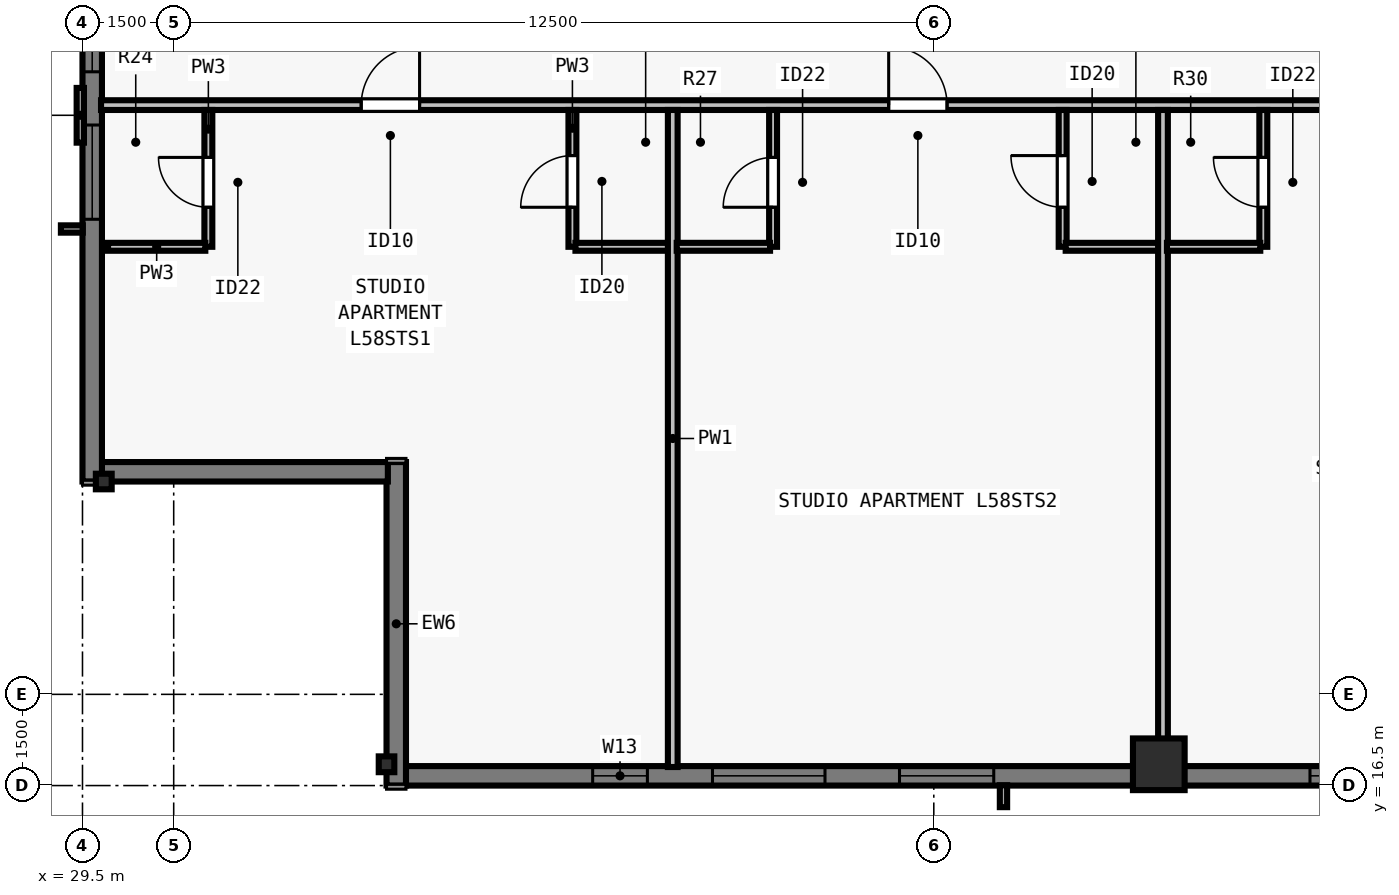
"""IFC4 building model, lengths in metres.
Left out: names, types, materials, properties, quantities, classifications, styles, units other than length and angle.
Written with IfcOpenShell. Run it as: python <this file> out.ifc"""

import sys

from ifc_helpers import new_model, si_unit, direction, frame, frame_2d, origin, origin_2d, place, context, subcontext, project, spatial, rectangle, i_section, extrude, element, fill, save


model = new_model("IFC4")
c1 = context("Model", 3, precision=1e-05, world=origin(), true_north=direction((0.0, 1.0)))
c2 = subcontext(c1, "Body", "Model", "MODEL_VIEW")
j1 = project(units=[si_unit("LENGTHUNIT", "METRE"), si_unit("PLANEANGLEUNIT", "RADIAN")], contexts=[c1])
p1 = place(None, origin())
s1 = spatial("IfcSite", under=j1, at=p1, CompositionType="ELEMENT")
p2 = place(p1, origin())
s2 = spatial("IfcBuilding", under=s1, at=p2, CompositionType="ELEMENT")
p3 = place(p2, frame((0.0, 0.0, 213.0)))
s3 = spatial("IfcBuildingStorey", under=s2, at=p3, CompositionType="ELEMENT", Elevation=213.0)
p4 = place(p3, frame((34.5, 16.85, 0.0), z_axis=(0.0, 0.0, 1.0), x_axis=(1.0, 0.0, 0.0)))
e1 = element("IfcColumn", 1, at=p4, inside=s3, PredefinedType="COLUMN", context=c2, shape_type="SweptSolid", body=[
    extrude(i_section(OverallWidth=0.256, OverallDepth=0.26, WebThickness=0.01, FlangeThickness=0.017, FilletRadius=0.013, at=origin_2d()), origin(), (0.0, 0.0, 1.0), 3.5),
])
p5 = place(p3, frame((47.2, 16.85, 0.0), z_axis=(0.0, 0.0, 1.0), x_axis=(1.0, 0.0, 0.0)))
e2 = element("IfcColumn", 2, at=p5, inside=s3, PredefinedType="COLUMN", context=c2, shape_type="SweptSolid", body=[
    extrude(rectangle(XDim=0.85, YDim=0.85, at=origin_2d()), origin(), (0.0, 0.0, 1.0), 3.5),
])
p6 = place(p3, frame((29.85, 21.5, 0.0), z_axis=(0.0, 0.0, 1.0), x_axis=(0.0, 1.0, 0.0)))
e3 = element("IfcColumn", 3, at=p6, inside=s3, PredefinedType="COLUMN", context=c2, shape_type="SweptSolid", body=[
    extrude(i_section(OverallWidth=0.256, OverallDepth=0.26, WebThickness=0.01, FlangeThickness=0.017, FilletRadius=0.013, at=origin_2d()), origin(), (0.0, 0.0, 1.0), 3.5),
])
p7 = place(p3, frame((69.5, 16.66, 0.0), z_axis=(0.0, 0.0, 1.0), x_axis=(-1.0, 0.0, 0.0)))
e4 = element("IfcWall", 4, at=p7, inside=s3, PredefinedType="SOLIDWALL", context=c2, shape_type="SweptSolid", body=[
    extrude(rectangle(XDim=34.702, YDim=0.32, at=frame_2d((17.351, 0.0))), origin(), (0.0, 0.0, 1.0), 3.29),
])
p8 = place(p7, frame((5.213, 0.0, 0.8)))
e5 = element("IfcOpeningElement", 5, at=p8, cuts=e4, PredefinedType="OPENING", context=c2, shape_type="SweptSolid", body=[
    extrude(rectangle(XDim=1.55, YDim=1.678, at=frame_2d((0.775, 0.839))), frame((0.0, 0.17, 0.0), z_axis=(0.0, -1.0, 0.0), x_axis=(1.0, 0.0, 0.0)), (0.0, 0.0, 1.0), 0.34),
])
p9 = place(p7, frame((7.988, 0.0, 0.8)))
e6 = element("IfcOpeningElement", 6, at=p9, cuts=e4, PredefinedType="OPENING", context=c2, shape_type="SweptSolid", body=[
    extrude(rectangle(XDim=1.85, YDim=1.678, at=frame_2d((0.925, 0.839))), frame((0.0, 0.17, 0.0), z_axis=(0.0, -1.0, 0.0), x_axis=(1.0, 0.0, 0.0)), (0.0, 0.0, 1.0), 0.34),
])
p10 = place(p7, frame((10.263, 0.0, 0.8)))
e7 = element("IfcOpeningElement", 7, at=p10, cuts=e4, PredefinedType="OPENING", context=c2, shape_type="SweptSolid", body=[
    extrude(rectangle(XDim=1.55, YDim=1.678, at=frame_2d((0.775, 0.839))), frame((0.0, 0.17, 0.0), z_axis=(0.0, -1.0, 0.0), x_axis=(1.0, 0.0, 0.0)), (0.0, 0.0, 1.0), 0.34),
])
p11 = place(p7, frame((14.738, 0.0, 0.8)))
e8 = element("IfcOpeningElement", 8, at=p11, cuts=e4, PredefinedType="OPENING", context=c2, shape_type="SweptSolid", body=[
    extrude(rectangle(XDim=1.85, YDim=1.678, at=frame_2d((0.925, 0.839))), frame((0.0, 0.17, 0.0), z_axis=(0.0, -1.0, 0.0), x_axis=(1.0, 0.0, 0.0)), (0.0, 0.0, 1.0), 0.34),
])
p12 = place(p7, frame((18.264, 0.0, 0.8)))
e9 = element("IfcOpeningElement", 9, at=p12, cuts=e4, PredefinedType="OPENING", context=c2, shape_type="SweptSolid", body=[
    extrude(rectangle(XDim=1.55, YDim=1.678, at=frame_2d((0.775, 0.839))), frame((0.0, 0.17, 0.0), z_axis=(0.0, -1.0, 0.0), x_axis=(1.0, 0.0, 0.0)), (0.0, 0.0, 1.0), 0.34),
])
p13 = place(p7, frame((25.014, 0.0, 0.8)))
e10 = element("IfcOpeningElement", 10, at=p13, cuts=e4, PredefinedType="OPENING", context=c2, shape_type="SweptSolid", body=[
    extrude(rectangle(XDim=1.55, YDim=1.678, at=frame_2d((0.775, 0.839))), frame((0.0, 0.17, 0.0), z_axis=(0.0, -1.0, 0.0), x_axis=(1.0, 0.0, 0.0)), (0.0, 0.0, 1.0), 0.34),
])
p14 = place(p7, frame((27.789, 0.0, 0.8)))
e11 = element("IfcOpeningElement", 11, at=p14, cuts=e4, PredefinedType="OPENING", context=c2, shape_type="SweptSolid", body=[
    extrude(rectangle(XDim=1.85, YDim=1.678, at=frame_2d((0.925, 0.839))), frame((0.0, 0.17, 0.0), z_axis=(0.0, -1.0, 0.0), x_axis=(1.0, 0.0, 0.0)), (0.0, 0.0, 1.0), 0.34),
])
p15 = place(p7, frame((30.71, 0.0, 0.8)))
e12 = element("IfcOpeningElement", 12, at=p15, cuts=e4, PredefinedType="OPENING", context=c2, shape_type="SweptSolid", body=[
    extrude(rectangle(XDim=0.9, YDim=1.678, at=frame_2d((0.45, 0.839))), frame((0.0, 0.17, 0.0), z_axis=(0.0, -1.0, 0.0), x_axis=(1.0, 0.0, 0.0)), (0.0, 0.0, 1.0), 0.34),
])
p16 = place(p3, frame((34.66, 16.5, 0.0), z_axis=(0.0, 0.0, 1.0), x_axis=(0.0, 1.0, 0.0)))
e13 = element("IfcWall", 13, at=p16, inside=s3, PredefinedType="SOLIDWALL", context=c2, shape_type="SweptSolid", body=[
    extrude(rectangle(XDim=5.32, YDim=0.32, at=frame_2d((2.66, 0.0))), origin(), (0.0, 0.0, 1.0), 3.29),
])
p17 = place(p3, frame((34.522, 21.66, 0.0), z_axis=(0.0, 0.0, 1.0), x_axis=(-1.0, 0.0, 0.0)))
e14 = element("IfcWall", 14, at=p17, inside=s3, PredefinedType="SOLIDWALL", context=c2, shape_type="SweptSolid", body=[
    extrude(rectangle(XDim=4.724, YDim=0.32, at=frame_2d((2.362, 0.0))), origin(), (0.0, 0.0, 1.0), 3.29),
])
p18 = place(p3, frame((29.66, 21.5, 0.0), z_axis=(0.0, 0.0, 1.0), x_axis=(0.0, 1.0, 0.0)))
e15 = element("IfcWall", 15, at=p18, inside=s3, PredefinedType="SOLIDWALL", context=c2, shape_type="SweptSolid", body=[
    extrude(rectangle(XDim=34.702, YDim=0.32, at=frame_2d((17.351, 0.0))), origin(), (0.0, 0.0, 1.0), 3.29),
])
p19 = place(p18, frame((4.312, 0.0, 0.8)))
e16 = element("IfcOpeningElement", 16, at=p19, cuts=e15, PredefinedType="OPENING", context=c2, shape_type="SweptSolid", body=[
    extrude(rectangle(XDim=1.55, YDim=1.678, at=frame_2d((0.775, 0.839))), frame((0.0, 0.17, 0.0), z_axis=(0.0, -1.0, 0.0), x_axis=(1.0, 0.0, 0.0)), (0.0, 0.0, 1.0), 0.34),
])
p20 = place(p18, frame((6.738, 0.0, 0.8)))
e17 = element("IfcOpeningElement", 17, at=p20, cuts=e15, PredefinedType="OPENING", context=c2, shape_type="SweptSolid", body=[
    extrude(rectangle(XDim=1.85, YDim=1.678, at=frame_2d((0.925, 0.839))), frame((0.0, 0.17, 0.0), z_axis=(0.0, -1.0, 0.0), x_axis=(1.0, 0.0, 0.0)), (0.0, 0.0, 1.0), 0.34),
])
p21 = place(p18, frame((10.263, 0.0, 0.8)))
e18 = element("IfcOpeningElement", 18, at=p21, cuts=e15, PredefinedType="OPENING", context=c2, shape_type="SweptSolid", body=[
    extrude(rectangle(XDim=1.55, YDim=1.678, at=frame_2d((0.775, 0.839))), frame((0.0, 0.17, 0.0), z_axis=(0.0, -1.0, 0.0), x_axis=(1.0, 0.0, 0.0)), (0.0, 0.0, 1.0), 0.34),
])
p22 = place(p18, frame((14.738, 0.0, 0.8)))
e19 = element("IfcOpeningElement", 19, at=p22, cuts=e15, PredefinedType="OPENING", context=c2, shape_type="SweptSolid", body=[
    extrude(rectangle(XDim=1.85, YDim=1.678, at=frame_2d((0.925, 0.839))), frame((0.0, 0.17, 0.0), z_axis=(0.0, -1.0, 0.0), x_axis=(1.0, 0.0, 0.0)), (0.0, 0.0, 1.0), 0.34),
])
p23 = place(p18, frame((18.264, 0.0, 0.8)))
e20 = element("IfcOpeningElement", 20, at=p23, cuts=e15, PredefinedType="OPENING", context=c2, shape_type="SweptSolid", body=[
    extrude(rectangle(XDim=1.55, YDim=1.678, at=frame_2d((0.775, 0.839))), frame((0.0, 0.17, 0.0), z_axis=(0.0, -1.0, 0.0), x_axis=(1.0, 0.0, 0.0)), (0.0, 0.0, 1.0), 0.34),
])
p24 = place(p18, frame((24.164, 0.0, 0.8)))
e21 = element("IfcOpeningElement", 21, at=p24, cuts=e15, PredefinedType="OPENING", context=c2, shape_type="SweptSolid", body=[
    extrude(rectangle(XDim=1.55, YDim=1.678, at=frame_2d((0.775, 0.839))), frame((0.0, 0.17, 0.0), z_axis=(0.0, -1.0, 0.0), x_axis=(1.0, 0.0, 0.0)), (0.0, 0.0, 1.0), 0.34),
])
p25 = place(p3, frame((29.805, 27.69, 0.0), z_axis=(0.0, 0.0, 1.0), x_axis=(1.0, 0.0, 0.0)))
e22 = element("IfcWall", 22, at=p25, inside=s3, PredefinedType="PARTITIONING", context=c2, shape_type="SweptSolid", body=[
    extrude(rectangle(XDim=44.39, YDim=0.16, at=frame_2d((22.195, 0.0))), origin(), (0.0, 0.0, 1.0), 2.958),
])
p26 = place(p25, frame((4.279, 0.0, 0.0)))
e23 = element("IfcOpeningElement", 23, at=p26, cuts=e22, PredefinedType="OPENING", context=c2, shape_type="SweptSolid", body=[
    extrude(rectangle(XDim=0.96, YDim=2.18, at=frame_2d((0.48, 1.09))), frame((0.0, 0.09, 0.0), z_axis=(0.0, -1.0, 0.0), x_axis=(1.0, 0.0, 0.0)), (0.0, 0.0, 1.0), 0.18),
])
p27 = place(p25, frame((12.953, 0.0, 0.0)))
e24 = element("IfcOpeningElement", 24, at=p27, cuts=e22, PredefinedType="OPENING", context=c2, shape_type="SweptSolid", body=[
    extrude(rectangle(XDim=0.96, YDim=2.18, at=frame_2d((0.48, 1.09))), frame((0.0, 0.09, 0.0), z_axis=(0.0, -1.0, 0.0), x_axis=(1.0, 0.0, 0.0)), (0.0, 0.0, 1.0), 0.18),
])
p28 = place(p25, frame((21.785, 0.0, 0.0)))
e25 = element("IfcOpeningElement", 25, at=p28, cuts=e22, PredefinedType="OPENING", context=c2, shape_type="SweptSolid", body=[
    extrude(rectangle(XDim=0.96, YDim=2.18, at=frame_2d((0.48, 1.09))), frame((0.0, 0.09, 0.0), z_axis=(0.0, -1.0, 0.0), x_axis=(1.0, 0.0, 0.0)), (0.0, 0.0, 1.0), 0.18),
])
p29 = place(p25, frame((30.617, 0.0, 0.0)))
e26 = element("IfcOpeningElement", 26, at=p29, cuts=e22, PredefinedType="OPENING", context=c2, shape_type="SweptSolid", body=[
    extrude(rectangle(XDim=0.96, YDim=2.18, at=frame_2d((0.48, 1.09))), frame((0.0, 0.09, 0.0), z_axis=(0.0, -1.0, 0.0), x_axis=(1.0, 0.0, 0.0)), (0.0, 0.0, 1.0), 0.18),
])
p30 = place(p25, frame((39.221, 0.0, 0.0)))
e27 = element("IfcOpeningElement", 27, at=p30, cuts=e22, PredefinedType="OPENING", context=c2, shape_type="SweptSolid", body=[
    extrude(rectangle(XDim=0.96, YDim=2.18, at=frame_2d((0.48, 1.09))), frame((0.0, 0.09, 0.0), z_axis=(0.0, -1.0, 0.0), x_axis=(1.0, 0.0, 0.0)), (0.0, 0.0, 1.0), 0.18),
])
p31 = place(p3, frame((31.57, 25.36, 0.0), z_axis=(0.0, 0.0, 1.0), x_axis=(0.0, 1.0, 0.0)))
e28 = element("IfcWall", 28, at=p31, inside=s3, PredefinedType="PLUMBINGWALL", context=c2, shape_type="SweptSolid", body=[
    extrude(rectangle(XDim=2.25, YDim=0.13, at=frame_2d((1.125, 0.0))), origin(), (0.0, 0.0, 1.0), 3.29),
])
p32 = place(p31, frame((0.65, 0.0, 0.0)))
e29 = element("IfcOpeningElement", 29, at=p32, cuts=e28, PredefinedType="OPENING", context=c2, shape_type="SweptSolid", body=[
    extrude(rectangle(XDim=0.82, YDim=2.1, at=frame_2d((0.41, 1.05))), frame((0.0, 0.075, 0.0), z_axis=(0.0, -1.0, 0.0), x_axis=(1.0, 0.0, 0.0)), (0.0, 0.0, 1.0), 0.15),
])
p33 = place(p3, frame((29.92, 25.36, 0.0), z_axis=(0.0, 0.0, 1.0), x_axis=(1.0, 0.0, 0.0)))
e30 = element("IfcWall", 30, at=p33, inside=s3, PredefinedType="PLUMBINGWALL", context=c2, shape_type="SweptSolid", body=[
    extrude(rectangle(XDim=1.6, YDim=0.13, at=frame_2d((0.8, 0.0))), origin(), (0.0, 0.0, 1.0), 3.29),
])
p34 = place(p3, frame((37.557, 25.36, 0.0), z_axis=(0.0, 0.0, 1.0), x_axis=(0.0, 1.0, 0.0)))
e31 = element("IfcWall", 31, at=p34, inside=s3, PredefinedType="PLUMBINGWALL", context=c2, shape_type="SweptSolid", body=[
    extrude(rectangle(XDim=2.25, YDim=0.13, at=frame_2d((1.125, 0.0))), origin(), (0.0, 0.0, 1.0), 3.29),
])
p35 = place(p34, frame((0.65, 0.0, 0.0)))
e32 = element("IfcOpeningElement", 32, at=p35, cuts=e31, PredefinedType="OPENING", context=c2, shape_type="SweptSolid", body=[
    extrude(rectangle(XDim=0.85, YDim=2.1, at=frame_2d((0.425, 1.05))), frame((0.0, 0.075, 0.0), z_axis=(0.0, -1.0, 0.0), x_axis=(1.0, 0.0, 0.0)), (0.0, 0.0, 1.0), 0.15),
])
p36 = place(p3, frame((37.607, 25.36, 0.0), z_axis=(0.0, 0.0, 1.0), x_axis=(1.0, 0.0, 0.0)))
e33 = element("IfcWall", 33, at=p36, inside=s3, PredefinedType="PLUMBINGWALL", context=c2, shape_type="SweptSolid", body=[
    extrude(rectangle(XDim=1.6, YDim=0.13, at=frame_2d((0.8, 0.0))), origin(), (0.0, 0.0, 1.0), 3.29),
])
p37 = place(p3, frame((39.207, 16.805, 0.0), z_axis=(0.0, 0.0, 1.0), x_axis=(0.0, 1.0, 0.0)))
e34 = element("IfcWall", 34, at=p37, inside=s3, PredefinedType="PARTITIONING", context=c2, shape_type="SweptSolid", body=[
    extrude(rectangle(XDim=10.805, YDim=0.16, at=frame_2d((5.403, 0.0))), origin(), (0.0, 0.0, 1.0), 2.573),
])
p38 = place(p3, frame((40.857, 25.36, 0.0), z_axis=(0.0, 0.0, 1.0), x_axis=(0.0, 1.0, 0.0)))
e35 = element("IfcWall", 35, at=p38, inside=s3, PredefinedType="PLUMBINGWALL", context=c2, shape_type="SweptSolid", body=[
    extrude(rectangle(XDim=2.25, YDim=0.13, at=frame_2d((1.125, 0.0))), origin(), (0.0, 0.0, 1.0), 2.573),
])
p39 = place(p38, frame((0.65, 0.0, 0.0)))
e36 = element("IfcOpeningElement", 36, at=p39, cuts=e35, PredefinedType="OPENING", context=c2, shape_type="SweptSolid", body=[
    extrude(rectangle(XDim=0.82, YDim=2.1, at=frame_2d((0.41, 1.05))), frame((0.0, 0.075, 0.0), z_axis=(0.0, -1.0, 0.0), x_axis=(1.0, 0.0, 0.0)), (0.0, 0.0, 1.0), 0.15),
])
p40 = place(p3, frame((39.272, 25.36, 0.0), z_axis=(0.0, 0.0, 1.0), x_axis=(1.0, 0.0, 0.0)))
e37 = element("IfcWall", 37, at=p40, inside=s3, PredefinedType="PLUMBINGWALL", context=c2, shape_type="SweptSolid", body=[
    extrude(rectangle(XDim=1.535, YDim=0.13, at=frame_2d((0.768, 0.0))), origin(), (0.0, 0.0, 1.0), 3.29),
])
p41 = place(p3, frame((45.619, 25.36, 0.0), z_axis=(0.0, 0.0, 1.0), x_axis=(0.0, 1.0, 0.0)))
e38 = element("IfcWall", 38, at=p41, inside=s3, PredefinedType="PLUMBINGWALL", context=c2, shape_type="SweptSolid", body=[
    extrude(rectangle(XDim=2.25, YDim=0.13, at=frame_2d((1.125, 0.0))), origin(), (0.0, 0.0, 1.0), 3.29),
])
p42 = place(p41, frame((0.65, 0.0, 0.0)))
e39 = element("IfcOpeningElement", 39, at=p42, cuts=e38, PredefinedType="OPENING", context=c2, shape_type="SweptSolid", body=[
    extrude(rectangle(XDim=0.85, YDim=2.1, at=frame_2d((0.425, 1.05))), frame((0.0, 0.075, 0.0), z_axis=(0.0, -1.0, 0.0), x_axis=(1.0, 0.0, 0.0)), (0.0, 0.0, 1.0), 0.15),
])
p43 = place(p3, frame((45.669, 25.36, 0.0), z_axis=(0.0, 0.0, 1.0), x_axis=(1.0, 0.0, 0.0)))
e40 = element("IfcWall", 40, at=p43, inside=s3, PredefinedType="PLUMBINGWALL", context=c2, shape_type="SweptSolid", body=[
    extrude(rectangle(XDim=1.6, YDim=0.13, at=frame_2d((0.8, 0.0))), origin(), (0.0, 0.0, 1.0), 3.29),
])
p44 = place(p3, frame((47.269, 16.805, 0.0), z_axis=(0.0, 0.0, 1.0), x_axis=(0.0, 1.0, 0.0)))
e41 = element("IfcWall", 41, at=p44, inside=s3, PredefinedType="PARTITIONING", context=c2, shape_type="SweptSolid", body=[
    extrude(rectangle(XDim=10.805, YDim=0.16, at=frame_2d((5.403, 0.0))), origin(), (0.0, 0.0, 1.0), 2.573),
])
p45 = place(p3, frame((48.919, 25.36, 0.0), z_axis=(0.0, 0.0, 1.0), x_axis=(0.0, 1.0, 0.0)))
e42 = element("IfcWall", 42, at=p45, inside=s3, PredefinedType="PLUMBINGWALL", context=c2, shape_type="SweptSolid", body=[
    extrude(rectangle(XDim=2.25, YDim=0.13, at=frame_2d((1.125, 0.0))), origin(), (0.0, 0.0, 1.0), 3.29),
])
p46 = place(p45, frame((0.65, 0.0, 0.0)))
e43 = element("IfcOpeningElement", 43, at=p46, cuts=e42, PredefinedType="OPENING", context=c2, shape_type="SweptSolid", body=[
    extrude(rectangle(XDim=0.82, YDim=2.1, at=frame_2d((0.41, 1.05))), frame((0.0, 0.075, 0.0), z_axis=(0.0, -1.0, 0.0), x_axis=(1.0, 0.0, 0.0)), (0.0, 0.0, 1.0), 0.15),
])
p47 = place(p3, frame((47.334, 25.36, 0.0), z_axis=(0.0, 0.0, 1.0), x_axis=(1.0, 0.0, 0.0)))
e44 = element("IfcWall", 44, at=p47, inside=s3, PredefinedType="PLUMBINGWALL", context=c2, shape_type="SweptSolid", body=[
    extrude(rectangle(XDim=1.535, YDim=0.13, at=frame_2d((0.768, 0.0))), origin(), (0.0, 0.0, 1.0), 3.29),
])
p48 = place(p12, origin())
e45 = element("IfcWindow", 45, at=p48, inside=s3, PartitioningType="SINGLE_PANEL", PredefinedType="WINDOW", context=c2, shape_type="SweptSolid", body=[
    extrude(rectangle(XDim=1.55, YDim=1.678, at=frame_2d((0.775, 0.839))), frame((0.0, -0.05, 0.0), z_axis=(0.0, -1.0, 0.0), x_axis=(1.0, 0.0, 0.0)), (0.0, 0.0, 1.0), 0.06),
])
fill(e9, e45)
p49 = place(p13, origin())
e46 = element("IfcWindow", 46, at=p49, inside=s3, PartitioningType="SINGLE_PANEL", PredefinedType="WINDOW", context=c2, shape_type="SweptSolid", body=[
    extrude(rectangle(XDim=1.55, YDim=1.678, at=frame_2d((0.775, 0.839))), frame((0.0, -0.05, 0.0), z_axis=(0.0, -1.0, 0.0), x_axis=(1.0, 0.0, 0.0)), (0.0, 0.0, 1.0), 0.06),
])
fill(e10, e46)
p50 = place(p14, origin())
e47 = element("IfcWindow", 47, at=p50, inside=s3, PartitioningType="SINGLE_PANEL", PredefinedType="WINDOW", context=c2, shape_type="SweptSolid", body=[
    extrude(rectangle(XDim=1.85, YDim=1.678, at=frame_2d((0.925, 0.839))), frame((0.0, -0.05, 0.0), z_axis=(0.0, -1.0, 0.0), x_axis=(1.0, 0.0, 0.0)), (0.0, 0.0, 1.0), 0.06),
])
fill(e11, e47)
p51 = place(p19, origin())
e48 = element("IfcWindow", 48, at=p51, inside=s3, PartitioningType="SINGLE_PANEL", PredefinedType="WINDOW", context=c2, shape_type="SweptSolid", body=[
    extrude(rectangle(XDim=1.55, YDim=1.678, at=frame_2d((0.775, 0.839))), frame((0.0, -0.05, 0.0), z_axis=(0.0, -1.0, 0.0), x_axis=(1.0, 0.0, 0.0)), (0.0, 0.0, 1.0), 0.06),
])
fill(e16, e48)
p52 = place(p20, origin())
e49 = element("IfcWindow", 49, at=p52, inside=s3, PartitioningType="SINGLE_PANEL", PredefinedType="WINDOW", context=c2, shape_type="SweptSolid", body=[
    extrude(rectangle(XDim=1.85, YDim=1.678, at=frame_2d((0.925, 0.839))), frame((0.0, -0.05, 0.0), z_axis=(0.0, -1.0, 0.0), x_axis=(1.0, 0.0, 0.0)), (0.0, 0.0, 1.0), 0.06),
])
fill(e17, e49)
p53 = place(p15, origin())
e50 = element("IfcWindow", 50, at=p53, inside=s3, PartitioningType="SINGLE_PANEL", PredefinedType="WINDOW", context=c2, shape_type="SweptSolid", body=[
    extrude(rectangle(XDim=0.9, YDim=1.678, at=frame_2d((0.45, 0.839))), frame((0.0, -0.04, 0.0), z_axis=(0.0, -1.0, 0.0), x_axis=(1.0, 0.0, 0.0)), (0.0, 0.0, 1.0), 0.06),
])
fill(e12, e50)
p54 = place(p32, origin())
e51 = element("IfcDoor", 51, at=p54, inside=s3, OperationType="SINGLE_SWING_RIGHT", PredefinedType="DOOR", context=c2, shape_type="SweptSolid", body=[
    extrude(rectangle(XDim=0.82, YDim=2.1, at=frame_2d((0.41, 1.05))), frame((0.0, 0.025, 0.0), z_axis=(0.0, -1.0, 0.0), x_axis=(1.0, 0.0, 0.0)), (0.0, 0.0, 1.0), 0.05),
])
fill(e29, e51)
p55 = place(p35, origin())
e52 = element("IfcDoor", 52, at=p55, inside=s3, OperationType="SINGLE_SWING_LEFT", PredefinedType="DOOR", context=c2, shape_type="SweptSolid", body=[
    extrude(rectangle(XDim=0.85, YDim=2.1, at=frame_2d((0.425, 1.05))), frame((0.0, 0.025, 0.0), z_axis=(0.0, -1.0, 0.0), x_axis=(1.0, 0.0, 0.0)), (0.0, 0.0, 1.0), 0.05),
])
fill(e32, e52)
p56 = place(p26, origin())
e53 = element("IfcDoor", 53, at=p56, inside=s3, OperationType="SINGLE_SWING_RIGHT", PredefinedType="DOOR", context=c2, shape_type="SweptSolid", body=[
    extrude(rectangle(XDim=0.96, YDim=2.18, at=frame_2d((0.48, 1.09))), frame((0.0, 0.025, 0.0), z_axis=(0.0, -1.0, 0.0), x_axis=(1.0, 0.0, 0.0)), (0.0, 0.0, 1.0), 0.05),
])
fill(e23, e53)
p57 = place(p39, origin())
e54 = element("IfcDoor", 54, at=p57, inside=s3, OperationType="SINGLE_SWING_LEFT", PredefinedType="DOOR", context=c2, shape_type="SweptSolid", body=[
    extrude(rectangle(XDim=0.82, YDim=2.1, at=frame_2d((0.41, 1.05))), frame((0.0, 0.025, 0.0), z_axis=(0.0, -1.0, 0.0), x_axis=(1.0, 0.0, 0.0)), (0.0, 0.0, 1.0), 0.05),
])
fill(e36, e54)
p58 = place(p42, origin())
e55 = element("IfcDoor", 55, at=p58, inside=s3, OperationType="SINGLE_SWING_RIGHT", PredefinedType="DOOR", context=c2, shape_type="SweptSolid", body=[
    extrude(rectangle(XDim=0.85, YDim=2.1, at=frame_2d((0.425, 1.05))), frame((0.0, 0.025, 0.0), z_axis=(0.0, -1.0, 0.0), x_axis=(1.0, 0.0, 0.0)), (0.0, 0.0, 1.0), 0.05),
])
fill(e39, e55)
p59 = place(p27, origin())
e56 = element("IfcDoor", 56, at=p59, inside=s3, OperationType="SINGLE_SWING_LEFT", PredefinedType="DOOR", context=c2, shape_type="SweptSolid", body=[
    extrude(rectangle(XDim=0.96, YDim=2.18, at=frame_2d((0.48, 1.09))), frame((0.0, 0.025, 0.0), z_axis=(0.0, -1.0, 0.0), x_axis=(1.0, 0.0, 0.0)), (0.0, 0.0, 1.0), 0.05),
])
fill(e24, e56)
p60 = place(p46, origin())
e57 = element("IfcDoor", 57, at=p60, inside=s3, OperationType="SINGLE_SWING_RIGHT", PredefinedType="DOOR", context=c2, shape_type="SweptSolid", body=[
    extrude(rectangle(XDim=0.82, YDim=2.1, at=frame_2d((0.41, 1.05))), frame((0.0, 0.025, 0.0), z_axis=(0.0, -1.0, 0.0), x_axis=(1.0, 0.0, 0.0)), (0.0, 0.0, 1.0), 0.05),
])
fill(e43, e57)
save(model, sys.argv[1])
